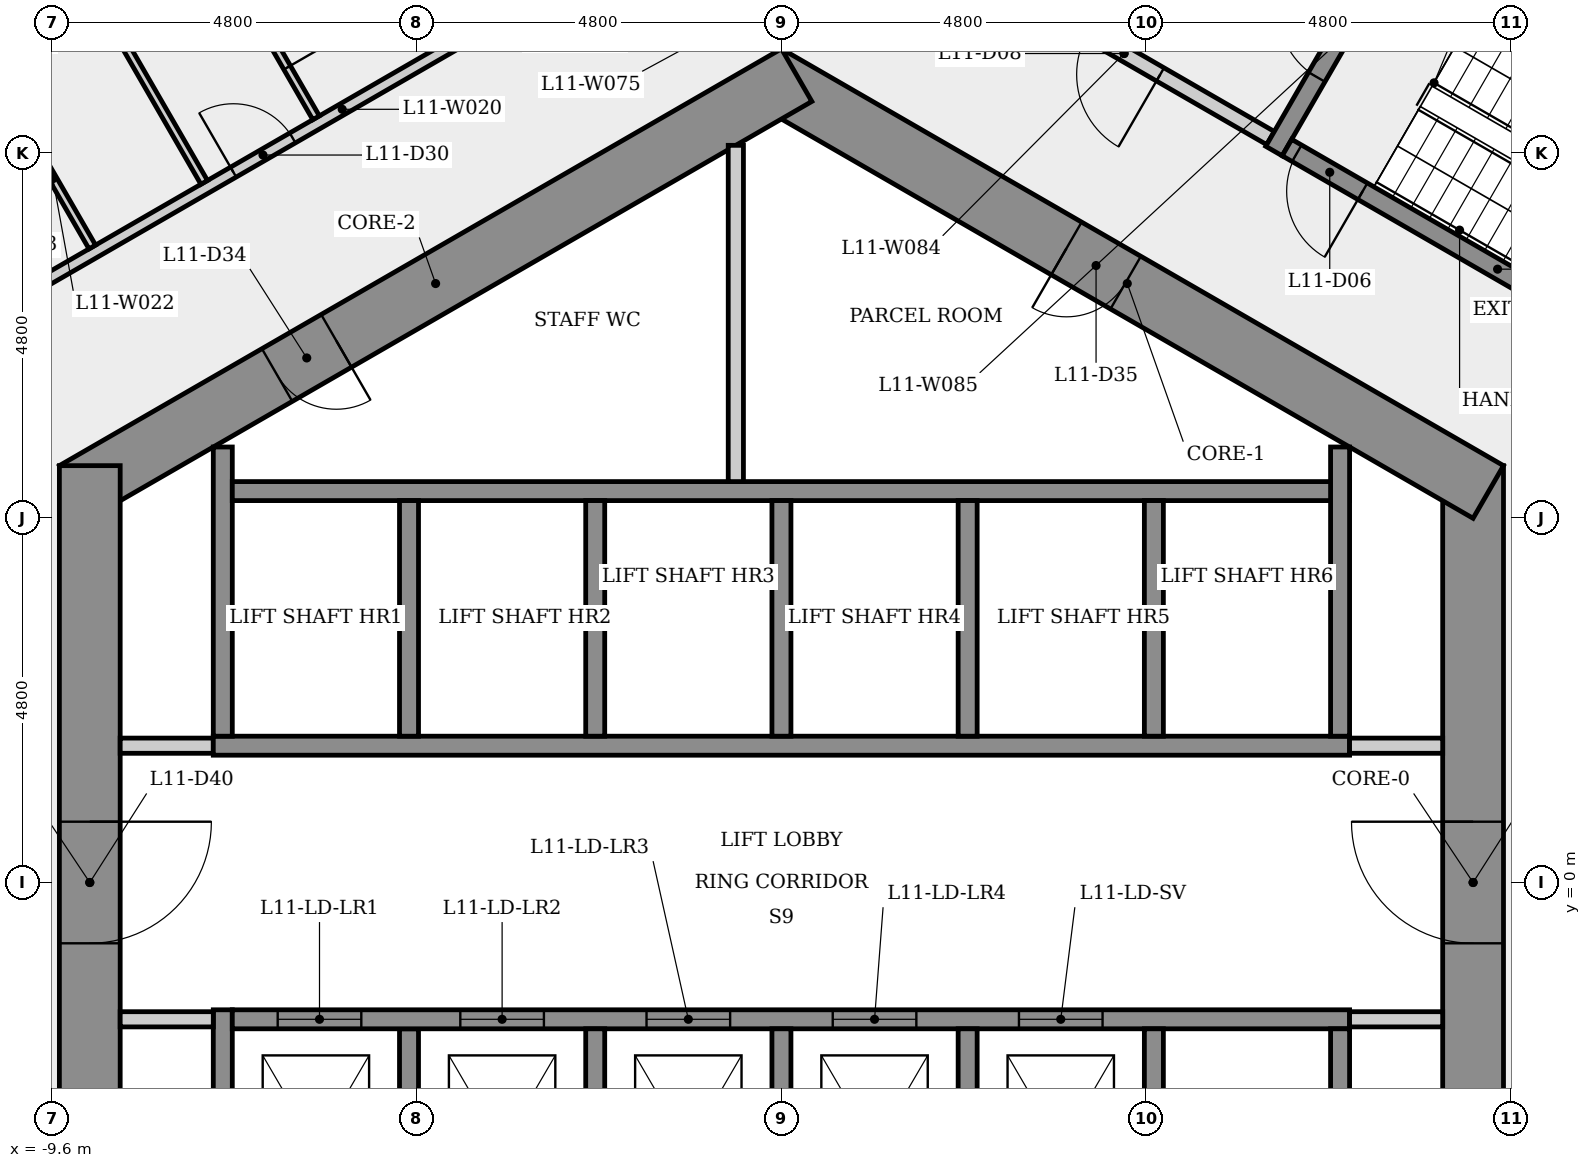
"""IFC4 building model, lengths in metres.
Left out: names, types, materials, properties, quantities, classifications, styles, units other than length and angle.
Written with IfcOpenShell. Run it as: python <this file> out.ifc"""

import sys

from ifc_helpers import new_model, si_unit, direction, frame, frame_2d, origin, place, context, subcontext, project, spatial, rectangle, extrude, element, fill, save


model = new_model("IFC4")
c1 = context("Model", 3, precision=1e-05, world=origin(), true_north=direction((0.0, 1.0)))
c2 = subcontext(c1, "Body", "Model", "MODEL_VIEW")
j1 = project(units=[si_unit("LENGTHUNIT", "METRE"), si_unit("PLANEANGLEUNIT", "RADIAN")], contexts=[c1])
p1 = place(None, origin())
s1 = spatial("IfcSite", under=j1, at=p1, CompositionType="ELEMENT")
p2 = place(p1, origin())
s2 = spatial("IfcBuilding", under=s1, at=p2, CompositionType="ELEMENT")
p3 = place(p2, frame((0.0, 0.0, 45.9)))
s3 = spatial("IfcBuildingStorey", under=s2, at=p3, CompositionType="ELEMENT", Elevation=45.9)
p4 = place(p3, frame((9.1, -5.485, 0.0), z_axis=(0.0, 0.0, 1.0), x_axis=(0.0, 1.0, 0.0)))
e1 = element("IfcWall", 1, at=p4, inside=s3, PredefinedType="SHEAR", context=c2, shape_type="SweptSolid", body=[
    extrude(rectangle(XDim=10.97, YDim=0.8, at=frame_2d((5.485, 0.0))), origin(), (0.0, 0.0, 1.0), 3.4),
])
p5 = place(p4, frame((4.685, 0.0, 0.0)))
e2 = element("IfcOpeningElement", 2, at=p5, cuts=e1, PredefinedType="OPENING", context=c2, shape_type="SweptSolid", body=[
    extrude(rectangle(XDim=1.6, YDim=2.1, at=frame_2d((0.8, 1.05))), frame((0.0, 0.41, 0.0), z_axis=(0.0, -1.0, 0.0), x_axis=(1.0, 0.0, 0.0)), (0.0, 0.0, 1.0), 0.82),
])
p6 = place(p3, frame((9.3, 5.138, 0.0), z_axis=(0.0, 0.0, 1.0), x_axis=(-0.866023993627, 0.500002442456, 0.0)))
e3 = element("IfcWall", 3, at=p6, inside=s3, PredefinedType="SHEAR", context=c2, shape_type="SweptSolid", body=[
    extrude(rectangle(XDim=10.97, YDim=0.8, at=frame_2d((5.485, 0.0))), origin(), (0.0, 0.0, 1.0), 3.4),
])
p7 = place(p6, frame((5.509, 0.0, 0.0)))
e4 = element("IfcOpeningElement", 4, at=p7, cuts=e3, PredefinedType="OPENING", context=c2, shape_type="SweptSolid", body=[
    extrude(rectangle(XDim=0.9, YDim=2.1, at=frame_2d((0.45, 1.05))), frame((0.0, 0.41, 0.0), z_axis=(0.0, -1.0, 0.0), x_axis=(1.0, 0.0, 0.0)), (0.0, 0.0, 1.0), 0.82),
])
p8 = place(p3, frame((0.2, 10.623, 0.0), z_axis=(0.0, 0.0, 1.0), x_axis=(-0.866023993627, -0.500002442456, 0.0)))
e5 = element("IfcWall", 5, at=p8, inside=s3, PredefinedType="SHEAR", context=c2, shape_type="SweptSolid", body=[
    extrude(rectangle(XDim=10.97, YDim=0.8, at=frame_2d((5.485, 0.0))), origin(), (0.0, 0.0, 1.0), 3.4),
])
p9 = place(p8, frame((6.993, 0.0, 0.0)))
e6 = element("IfcOpeningElement", 6, at=p9, cuts=e5, PredefinedType="OPENING", context=c2, shape_type="SweptSolid", body=[
    extrude(rectangle(XDim=0.9, YDim=2.1, at=frame_2d((0.45, 1.05))), frame((0.0, 0.41, 0.0), z_axis=(0.0, -1.0, 0.0), x_axis=(1.0, 0.0, 0.0)), (0.0, 0.0, 1.0), 0.82),
])
p10 = place(p3, frame((-9.1, 5.485, 0.0), z_axis=(0.0, 0.0, 1.0), x_axis=(0.0, -1.0, 0.0)))
e7 = element("IfcWall", 7, at=p10, inside=s3, PredefinedType="SHEAR", context=c2, shape_type="SweptSolid", body=[
    extrude(rectangle(XDim=10.97, YDim=0.8, at=frame_2d((5.485, 0.0))), origin(), (0.0, 0.0, 1.0), 3.4),
])
p11 = place(p10, frame((4.685, 0.0, 0.0)))
e8 = element("IfcOpeningElement", 8, at=p11, cuts=e7, PredefinedType="OPENING", context=c2, shape_type="SweptSolid", body=[
    extrude(rectangle(XDim=1.6, YDim=2.1, at=frame_2d((0.8, 1.05))), frame((0.0, 0.41, 0.0), z_axis=(0.0, -1.0, 0.0), x_axis=(1.0, 0.0, 0.0)), (0.0, 0.0, 1.0), 0.82),
])
p12 = place(p3, frame((-10.83, 7.258, 0.0), z_axis=(0.0, 0.0, 1.0), x_axis=(0.86602420186, 0.500002081789, 0.0)))
e9 = element("IfcWall", 9, at=p12, inside=s3, PredefinedType="PARTITIONING", context=c2, shape_type="SweptSolid", body=[
    extrude(rectangle(XDim=11.664, YDim=0.15, at=frame_2d((5.832, 0.0))), origin(), (0.0, 0.0, 1.0), 3.05),
])
p13 = place(p12, frame((4.178, 0.0, 0.0)))
e10 = element("IfcOpeningElement", 10, at=p13, cuts=e9, PredefinedType="OPENING", context=c2, shape_type="SweptSolid", body=[
    extrude(rectangle(XDim=0.9, YDim=2.1, at=frame_2d((0.45, 1.05))), frame((0.0, 0.085, 0.0), z_axis=(0.0, -1.0, 0.0), x_axis=(1.0, 0.0, 0.0)), (0.0, 0.0, 1.0), 0.17),
])
p14 = place(p3, frame((-9.067, 8.362, 0.0), z_axis=(0.0, 0.0, 1.0), x_axis=(-0.500061949227, 0.865989634427, 0.0)))
e11 = element("IfcWall", 11, at=p14, inside=s3, PredefinedType="PARTITIONING", context=c2, shape_type="SweptSolid", body=[
    extrude(rectangle(XDim=2.075, YDim=0.1, at=frame_2d((1.038, 0.0))), origin(), (0.0, 0.0, 1.0), 3.05),
])
p15 = place(p3, frame((-8.7, 1.8, 0.0), z_axis=(0.0, 0.0, 1.0), x_axis=(1.0, 0.0, 0.0)))
e12 = element("IfcWall", 12, at=p15, inside=s3, PredefinedType="PARTITIONING", context=c2, shape_type="SweptSolid", body=[
    extrude(rectangle(XDim=1.225, YDim=0.2, at=frame_2d((0.613, 0.0))), origin(), (0.0, 0.0, 1.0), 3.05),
])
p16 = place(p3, frame((-7.595, 9.212, 0.0), z_axis=(0.0, 0.0, 1.0), x_axis=(-0.500009404554, 0.866019973994, 0.0)))
e13 = element("IfcWall", 13, at=p16, inside=s3, PredefinedType="PARTITIONING", context=c2, shape_type="SweptSolid", body=[
    extrude(rectangle(XDim=9.01, YDim=0.1, at=frame_2d((4.505, 0.0))), origin(), (0.0, 0.0, 1.0), 3.05),
])
p17 = place(p3, frame((-7.475, 1.8, 0.0), z_axis=(0.0, 0.0, 1.0), x_axis=(1.0, 0.0, 0.0)))
e14 = element("IfcWall", 14, at=p17, inside=s3, PredefinedType="SHEAR", context=c2, shape_type="SweptSolid", body=[
    extrude(rectangle(XDim=14.95, YDim=0.25, at=frame_2d((7.475, 0.0))), origin(), (0.0, 0.0, 1.0), 3.05),
])
p18 = place(p3, frame((-7.35, -5.73, 0.0), z_axis=(0.0, 0.0, 1.0), x_axis=(0.0, 1.0, 0.0)))
e15 = element("IfcWall", 15, at=p18, inside=s3, PredefinedType="SHEAR", context=c2, shape_type="SweptSolid", body=[
    extrude(rectangle(XDim=4.055, YDim=0.25, at=frame_2d((2.028, 0.0))), origin(), (0.0, 0.0, 1.0), 3.05),
])
p19 = place(p3, frame((-7.35, 1.925, 0.0), z_axis=(0.0, 0.0, 1.0), x_axis=(0.0, 1.0, 0.0)))
e16 = element("IfcWall", 16, at=p19, inside=s3, PredefinedType="SHEAR", context=c2, shape_type="SweptSolid", body=[
    extrude(rectangle(XDim=3.805, YDim=0.25, at=frame_2d((1.903, 0.0))), origin(), (0.0, 0.0, 1.0), 3.05),
])
p20 = place(p3, frame((-7.225, 5.15, 0.0), z_axis=(0.0, 0.0, 1.0), x_axis=(1.0, 0.0, 0.0)))
e17 = element("IfcWall", 17, at=p20, inside=s3, PredefinedType="SHEAR", context=c2, shape_type="SweptSolid", body=[
    extrude(rectangle(XDim=14.7, YDim=0.25, at=frame_2d((7.35, 0.0))), origin(), (0.0, 0.0, 1.0), 3.05),
])
p21 = place(p3, frame((-7.475, -1.8, 0.0), z_axis=(0.0, 0.0, 1.0), x_axis=(-1.0, 0.0, 0.0)))
e18 = element("IfcWall", 18, at=p21, inside=s3, PredefinedType="PARTITIONING", context=c2, shape_type="SweptSolid", body=[
    extrude(rectangle(XDim=1.225, YDim=0.2, at=frame_2d((0.613, 0.0))), origin(), (0.0, 0.0, 1.0), 3.05),
])
p22 = place(p3, frame((-7.31, 12.119, 0.0), z_axis=(0.0, 0.0, 1.0), x_axis=(0.499986429846, -0.866033238375, 0.0)))
e19 = element("IfcWall", 19, at=p22, inside=s3, PredefinedType="PARTITIONING", context=c2, shape_type="SweptSolid", body=[
    extrude(rectangle(XDim=2.375, YDim=0.1, at=frame_2d((1.188, 0.0))), origin(), (0.0, 0.0, 1.0), 3.05),
])
p23 = place(p22, frame((0.812, 0.0, 0.0)))
e20 = element("IfcOpeningElement", 20, at=p23, cuts=e19, PredefinedType="OPENING", context=c2, shape_type="SweptSolid", body=[
    extrude(rectangle(XDim=0.8, YDim=2.1, at=frame_2d((0.4, 1.05))), frame((0.0, 0.06, 0.0), z_axis=(0.0, -1.0, 0.0), x_axis=(1.0, 0.0, 0.0)), (0.0, 0.0, 1.0), 0.12),
])
for number, where, z_axis, x_axis in (
    (21, (-4.9, -1.925, 0.0), (0.0, 0.0, 1.0), (0.0, -1.0, 0.0)),
    (22, (-4.9, 5.025, 0.0), (0.0, 0.0, 1.0), (0.0, -1.0, 0.0)),
):
    element("IfcWall", number, at=place(p3, frame(where, z_axis=z_axis, x_axis=x_axis)), inside=s3, PredefinedType="SHEAR", context=c2, shape_type="SweptSolid", body=[
        extrude(rectangle(XDim=3.1, YDim=0.25, at=frame_2d((1.55, 0.0))), origin(), (0.0, 0.0, 1.0), 3.4),
    ])
p24 = place(p3, frame((-7.225, -1.8, 0.0), z_axis=(0.0, 0.0, 1.0), x_axis=(1.0, 0.0, 0.0)))
e23 = element("IfcWall", 23, at=p24, inside=s3, PredefinedType="SHEAR", context=c2, shape_type="SweptSolid", body=[
    extrude(rectangle(XDim=14.7, YDim=0.25, at=frame_2d((7.35, 0.0))), origin(), (0.0, 0.0, 1.0), 3.05),
])
p25 = place(p24, frame((0.597, 0.0, 0.0)))
e24 = element("IfcOpeningElement", 24, at=p25, cuts=e23, PredefinedType="OPENING", context=c2, shape_type="SweptSolid", body=[
    extrude(rectangle(XDim=1.1, YDim=2.1, at=frame_2d((0.55, 1.05))), frame((0.0, 0.135, 0.0), z_axis=(0.0, -1.0, 0.0), x_axis=(1.0, 0.0, 0.0)), (0.0, 0.0, 1.0), 0.27),
])
p26 = place(p24, frame((3.0, 0.0, 0.0)))
e25 = element("IfcOpeningElement", 25, at=p26, cuts=e23, PredefinedType="OPENING", context=c2, shape_type="SweptSolid", body=[
    extrude(rectangle(XDim=1.1, YDim=2.1, at=frame_2d((0.55, 1.05))), frame((0.0, 0.135, 0.0), z_axis=(0.0, -1.0, 0.0), x_axis=(1.0, 0.0, 0.0)), (0.0, 0.0, 1.0), 0.27),
])
p27 = place(p24, frame((5.45, 0.0, 0.0)))
e26 = element("IfcOpeningElement", 26, at=p27, cuts=e23, PredefinedType="OPENING", context=c2, shape_type="SweptSolid", body=[
    extrude(rectangle(XDim=1.1, YDim=2.1, at=frame_2d((0.55, 1.05))), frame((0.0, 0.135, 0.0), z_axis=(0.0, -1.0, 0.0), x_axis=(1.0, 0.0, 0.0)), (0.0, 0.0, 1.0), 0.27),
])
p28 = place(p24, frame((7.9, 0.0, 0.0)))
e27 = element("IfcOpeningElement", 27, at=p28, cuts=e23, PredefinedType="OPENING", context=c2, shape_type="SweptSolid", body=[
    extrude(rectangle(XDim=1.1, YDim=2.1, at=frame_2d((0.55, 1.05))), frame((0.0, 0.135, 0.0), z_axis=(0.0, -1.0, 0.0), x_axis=(1.0, 0.0, 0.0)), (0.0, 0.0, 1.0), 0.27),
])
p29 = place(p24, frame((10.35, 0.0, 0.0)))
e28 = element("IfcOpeningElement", 28, at=p29, cuts=e23, PredefinedType="OPENING", context=c2, shape_type="SweptSolid", body=[
    extrude(rectangle(XDim=1.1, YDim=2.1, at=frame_2d((0.55, 1.05))), frame((0.0, 0.135, 0.0), z_axis=(0.0, -1.0, 0.0), x_axis=(1.0, 0.0, 0.0)), (0.0, 0.0, 1.0), 0.27),
])
for number, where, z_axis, x_axis in (
    (29, (-2.45, -1.925, 0.0), (0.0, 0.0, 1.0), (0.0, -1.0, 0.0)),
    (30, (-2.45, 5.025, 0.0), (0.0, 0.0, 1.0), (0.0, -1.0, 0.0)),
):
    element("IfcWall", number, at=place(p3, frame(where, z_axis=z_axis, x_axis=x_axis)), inside=s3, PredefinedType="SHEAR", context=c2, shape_type="SweptSolid", body=[
        extrude(rectangle(XDim=3.1, YDim=0.25, at=frame_2d((1.55, 0.0))), origin(), (0.0, 0.0, 1.0), 3.4),
    ])
p30 = place(p3, frame((-0.6, 9.699, 0.0), z_axis=(0.0, 0.0, 1.0), x_axis=(0.0, -1.0, 0.0)))
e31 = element("IfcWall", 31, at=p30, inside=s3, PredefinedType="PARTITIONING", context=c2, shape_type="SweptSolid", body=[
    extrude(rectangle(XDim=4.425, YDim=0.2, at=frame_2d((2.212, 0.0))), origin(), (0.0, 0.0, 1.0), 3.05),
])
for number, where, z_axis, x_axis in (
    (32, (0.0, -1.925, 0.0), (0.0, 0.0, 1.0), (0.0, -1.0, 0.0)),
    (33, (0.0, 5.025, 0.0), (0.0, 0.0, 1.0), (0.0, -1.0, 0.0)),
    (34, (2.45, -1.925, 0.0), (0.0, 0.0, 1.0), (0.0, -1.0, 0.0)),
    (35, (2.45, 5.025, 0.0), (0.0, 0.0, 1.0), (0.0, -1.0, 0.0)),
    (36, (4.9, -1.925, 0.0), (0.0, 0.0, 1.0), (0.0, -1.0, 0.0)),
    (37, (4.9, 5.025, 0.0), (0.0, 0.0, 1.0), (0.0, -1.0, 0.0)),
):
    element("IfcWall", number, at=place(p3, frame(where, z_axis=z_axis, x_axis=x_axis)), inside=s3, PredefinedType="SHEAR", context=c2, shape_type="SweptSolid", body=[
        extrude(rectangle(XDim=3.1, YDim=0.25, at=frame_2d((1.55, 0.0))), origin(), (0.0, 0.0, 1.0), 3.4),
    ])
p31 = place(p3, frame((6.435, 9.795, 0.0), z_axis=(0.0, 0.0, 1.0), x_axis=(-0.866012907634, 0.500021643343, 0.0)))
e38 = element("IfcWall", 38, at=p31, inside=s3, PredefinedType="PARTITIONING", context=c2, shape_type="SweptSolid", body=[
    extrude(rectangle(XDim=4.45, YDim=0.2, at=frame_2d((2.225, 0.0))), origin(), (0.0, 0.0, 1.0), 3.05),
])
p32 = place(p31, frame((1.675, 0.0, 0.0)))
e39 = element("IfcOpeningElement", 39, at=p32, cuts=e38, PredefinedType="OPENING", context=c2, shape_type="SweptSolid", body=[
    extrude(rectangle(XDim=1.1, YDim=2.1, at=frame_2d((0.55, 1.05))), frame((0.0, 0.11, 0.0), z_axis=(0.0, -1.0, 0.0), x_axis=(1.0, 0.0, 0.0)), (0.0, 0.0, 1.0), 0.22),
])
p33 = place(p3, frame((6.48, 9.624, 0.0), z_axis=(0.0, 0.0, 1.0), x_axis=(0.500017246033, 0.866015446554, 0.0)))
e40 = element("IfcWall", 40, at=p33, inside=s3, PredefinedType="SHEAR", context=c2, shape_type="SweptSolid", body=[
    extrude(rectangle(XDim=3.25, YDim=0.25, at=frame_2d((1.625, 0.0))), origin(), (0.0, 0.0, 1.0), 3.05),
])
p34 = place(p33, frame((1.125, 0.0, 0.0)))
e41 = element("IfcOpeningElement", 41, at=p34, cuts=e40, PredefinedType="OPENING", context=c2, shape_type="SweptSolid", body=[
    extrude(rectangle(XDim=1.0, YDim=2.1, at=frame_2d((0.5, 1.05))), frame((0.0, 0.135, 0.0), z_axis=(0.0, -1.0, 0.0), x_axis=(1.0, 0.0, 0.0)), (0.0, 0.0, 1.0), 0.27),
])
p35 = place(p3, frame((7.475, 1.8, 0.0), z_axis=(0.0, 0.0, 1.0), x_axis=(1.0, 0.0, 0.0)))
e42 = element("IfcWall", 42, at=p35, inside=s3, PredefinedType="PARTITIONING", context=c2, shape_type="SweptSolid", body=[
    extrude(rectangle(XDim=1.225, YDim=0.2, at=frame_2d((0.613, 0.0))), origin(), (0.0, 0.0, 1.0), 3.05),
])
for number, where, z_axis, x_axis in (
    (43, (7.35, -1.925, 0.0), (0.0, 0.0, 1.0), (0.0, -1.0, 0.0)),
    (44, (7.35, 5.73, 0.0), (0.0, 0.0, 1.0), (0.0, -1.0, 0.0)),
):
    element("IfcWall", number, at=place(p3, frame(where, z_axis=z_axis, x_axis=x_axis)), inside=s3, PredefinedType="SHEAR", context=c2, shape_type="SweptSolid", body=[
        extrude(rectangle(XDim=3.805, YDim=0.25, at=frame_2d((1.903, 0.0))), origin(), (0.0, 0.0, 1.0), 3.05),
    ])
p36 = place(p3, frame((8.151, 12.268, 0.0), z_axis=(0.0, 0.0, 1.0), x_axis=(0.866025499775, -0.499999833739, 0.0)))
e45 = element("IfcWall", 45, at=p36, inside=s3, PredefinedType="SHEAR", context=c2, shape_type="SweptSolid", body=[
    extrude(rectangle(XDim=6.4, YDim=0.25, at=frame_2d((3.2, 0.0))), origin(), (0.0, 0.0, 1.0), 3.05),
])
p37 = place(p3, frame((8.7, -1.8, 0.0), z_axis=(0.0, 0.0, 1.0), x_axis=(-1.0, 0.0, 0.0)))
e46 = element("IfcWall", 46, at=p37, inside=s3, PredefinedType="PARTITIONING", context=c2, shape_type="SweptSolid", body=[
    extrude(rectangle(XDim=1.225, YDim=0.2, at=frame_2d((0.613, 0.0))), origin(), (0.0, 0.0, 1.0), 3.05),
])
p38 = place(p3, frame((12.194, 6.47, 0.0), z_axis=(0.0, 0.0, 1.0), x_axis=(-0.866025499775, 0.499999833739, 0.0)))
e47 = element("IfcWall", 47, at=p38, inside=s3, PredefinedType="SHEAR", context=c2, shape_type="SweptSolid", body=[
    extrude(rectangle(XDim=6.4, YDim=0.25, at=frame_2d((3.2, 0.0))), origin(), (0.0, 0.0, 1.0), 3.05),
])
p39 = place(p38, frame((5.25, 0.0, 0.0)))
e48 = element("IfcOpeningElement", 48, at=p39, cuts=e47, PredefinedType="OPENING", context=c2, shape_type="SweptSolid", body=[
    extrude(rectangle(XDim=1.0, YDim=2.1, at=frame_2d((0.5, 1.05))), frame((0.0, 0.135, 0.0), z_axis=(0.0, -1.0, 0.0), x_axis=(1.0, 0.0, 0.0)), (0.0, 0.0, 1.0), 0.27),
])
p40 = place(p25, origin())
e49 = element("IfcDoor", 49, at=p40, inside=s3, OperationType="SLIDING_TO_LEFT", PredefinedType="DOOR", context=c2, shape_type="SweptSolid", body=[
    extrude(rectangle(XDim=1.1, YDim=2.1, at=frame_2d((0.55, 1.05))), frame((0.0, 0.025, 0.0), z_axis=(0.0, -1.0, 0.0), x_axis=(1.0, 0.0, 0.0)), (0.0, 0.0, 1.0), 0.05),
])
fill(e24, e49)
p41 = place(p26, origin())
e50 = element("IfcDoor", 50, at=p41, inside=s3, OperationType="SLIDING_TO_LEFT", PredefinedType="DOOR", context=c2, shape_type="SweptSolid", body=[
    extrude(rectangle(XDim=1.1, YDim=2.1, at=frame_2d((0.55, 1.05))), frame((0.0, 0.025, 0.0), z_axis=(0.0, -1.0, 0.0), x_axis=(1.0, 0.0, 0.0)), (0.0, 0.0, 1.0), 0.05),
])
fill(e25, e50)
p42 = place(p27, origin())
e51 = element("IfcDoor", 51, at=p42, inside=s3, OperationType="SLIDING_TO_LEFT", PredefinedType="DOOR", context=c2, shape_type="SweptSolid", body=[
    extrude(rectangle(XDim=1.1, YDim=2.1, at=frame_2d((0.55, 1.05))), frame((0.0, 0.025, 0.0), z_axis=(0.0, -1.0, 0.0), x_axis=(1.0, 0.0, 0.0)), (0.0, 0.0, 1.0), 0.05),
])
fill(e26, e51)
p43 = place(p28, origin())
e52 = element("IfcDoor", 52, at=p43, inside=s3, OperationType="SLIDING_TO_LEFT", PredefinedType="DOOR", context=c2, shape_type="SweptSolid", body=[
    extrude(rectangle(XDim=1.1, YDim=2.1, at=frame_2d((0.55, 1.05))), frame((0.0, 0.025, 0.0), z_axis=(0.0, -1.0, 0.0), x_axis=(1.0, 0.0, 0.0)), (0.0, 0.0, 1.0), 0.05),
])
fill(e27, e52)
p44 = place(p29, origin())
e53 = element("IfcDoor", 53, at=p44, inside=s3, OperationType="SLIDING_TO_LEFT", PredefinedType="DOOR", context=c2, shape_type="SweptSolid", body=[
    extrude(rectangle(XDim=1.1, YDim=2.1, at=frame_2d((0.55, 1.05))), frame((0.0, 0.025, 0.0), z_axis=(0.0, -1.0, 0.0), x_axis=(1.0, 0.0, 0.0)), (0.0, 0.0, 1.0), 0.05),
])
fill(e28, e53)
p45 = place(p39, origin())
e54 = element("IfcDoor", 54, at=p45, inside=s3, OperationType="SINGLE_SWING_LEFT", PredefinedType="DOOR", context=c2, shape_type="SweptSolid", body=[
    extrude(rectangle(XDim=1.0, YDim=2.1, at=frame_2d((0.5, 1.05))), frame((0.0, 0.025, 0.0), z_axis=(0.0, -1.0, 0.0), x_axis=(1.0, 0.0, 0.0)), (0.0, 0.0, 1.0), 0.05),
])
fill(e48, e54)
p46 = place(p34, origin())
e55 = element("IfcDoor", 55, at=p46, inside=s3, OperationType="SINGLE_SWING_RIGHT", PredefinedType="DOOR", context=c2, shape_type="SweptSolid", body=[
    extrude(rectangle(XDim=1.0, YDim=2.1, at=frame_2d((0.5, 1.05))), frame((0.0, 0.025, 0.0), z_axis=(0.0, -1.0, 0.0), x_axis=(1.0, 0.0, 0.0)), (0.0, 0.0, 1.0), 0.05),
])
fill(e41, e55)
p47 = place(p32, origin())
e56 = element("IfcDoor", 56, at=p47, inside=s3, OperationType="SINGLE_SWING_LEFT", PredefinedType="DOOR", context=c2, shape_type="SweptSolid", body=[
    extrude(rectangle(XDim=1.1, YDim=2.1, at=frame_2d((0.55, 1.05))), frame((0.0, 0.025, 0.0), z_axis=(0.0, -1.0, 0.0), x_axis=(1.0, 0.0, 0.0)), (0.0, 0.0, 1.0), 0.05),
])
fill(e39, e56)
p48 = place(p13, origin())
e57 = element("IfcDoor", 57, at=p48, inside=s3, OperationType="SINGLE_SWING_LEFT", PredefinedType="DOOR", context=c2, shape_type="SweptSolid", body=[
    extrude(rectangle(XDim=0.9, YDim=2.1, at=frame_2d((0.45, 1.05))), frame((0.0, 0.025, 0.0), z_axis=(0.0, -1.0, 0.0), x_axis=(1.0, 0.0, 0.0)), (0.0, 0.0, 1.0), 0.05),
])
fill(e10, e57)
p49 = place(p23, origin())
e58 = element("IfcDoor", 58, at=p49, inside=s3, OperationType="SINGLE_SWING_RIGHT", PredefinedType="DOOR", context=c2, shape_type="SweptSolid", body=[
    extrude(rectangle(XDim=0.8, YDim=2.1, at=frame_2d((0.4, 1.05))), frame((0.0, 0.025, 0.0), z_axis=(0.0, -1.0, 0.0), x_axis=(1.0, 0.0, 0.0)), (0.0, 0.0, 1.0), 0.05),
])
fill(e20, e58)
p50 = place(p9, origin())
e59 = element("IfcDoor", 59, at=p50, inside=s3, OperationType="SINGLE_SWING_LEFT", PredefinedType="DOOR", context=c2, shape_type="SweptSolid", body=[
    extrude(rectangle(XDim=0.9, YDim=2.1, at=frame_2d((0.45, 1.05))), frame((0.0, 0.025, 0.0), z_axis=(0.0, -1.0, 0.0), x_axis=(1.0, 0.0, 0.0)), (0.0, 0.0, 1.0), 0.05),
])
fill(e6, e59)
p51 = place(p7, origin())
e60 = element("IfcDoor", 60, at=p51, inside=s3, OperationType="SINGLE_SWING_RIGHT", PredefinedType="DOOR", context=c2, shape_type="SweptSolid", body=[
    extrude(rectangle(XDim=0.9, YDim=2.1, at=frame_2d((0.45, 1.05))), frame((0.0, 0.025, 0.0), z_axis=(0.0, -1.0, 0.0), x_axis=(1.0, 0.0, 0.0)), (0.0, 0.0, 1.0), 0.05),
])
fill(e4, e60)
p52 = place(p5, origin())
e61 = element("IfcDoor", 61, at=p52, inside=s3, OperationType="SINGLE_SWING_RIGHT", PredefinedType="DOOR", context=c2, shape_type="SweptSolid", body=[
    extrude(rectangle(XDim=1.6, YDim=2.1, at=frame_2d((0.8, 1.05))), frame((0.0, 0.025, 0.0), z_axis=(0.0, -1.0, 0.0), x_axis=(1.0, 0.0, 0.0)), (0.0, 0.0, 1.0), 0.05),
])
fill(e2, e61)
p53 = place(p11, origin())
e62 = element("IfcDoor", 62, at=p53, inside=s3, OperationType="SINGLE_SWING_LEFT", PredefinedType="DOOR", context=c2, shape_type="SweptSolid", body=[
    extrude(rectangle(XDim=1.6, YDim=2.1, at=frame_2d((0.8, 1.05))), frame((0.0, 0.025, 0.0), z_axis=(0.0, -1.0, 0.0), x_axis=(1.0, 0.0, 0.0)), (0.0, 0.0, 1.0), 0.05),
])
fill(e8, e62)
save(model, sys.argv[1])
